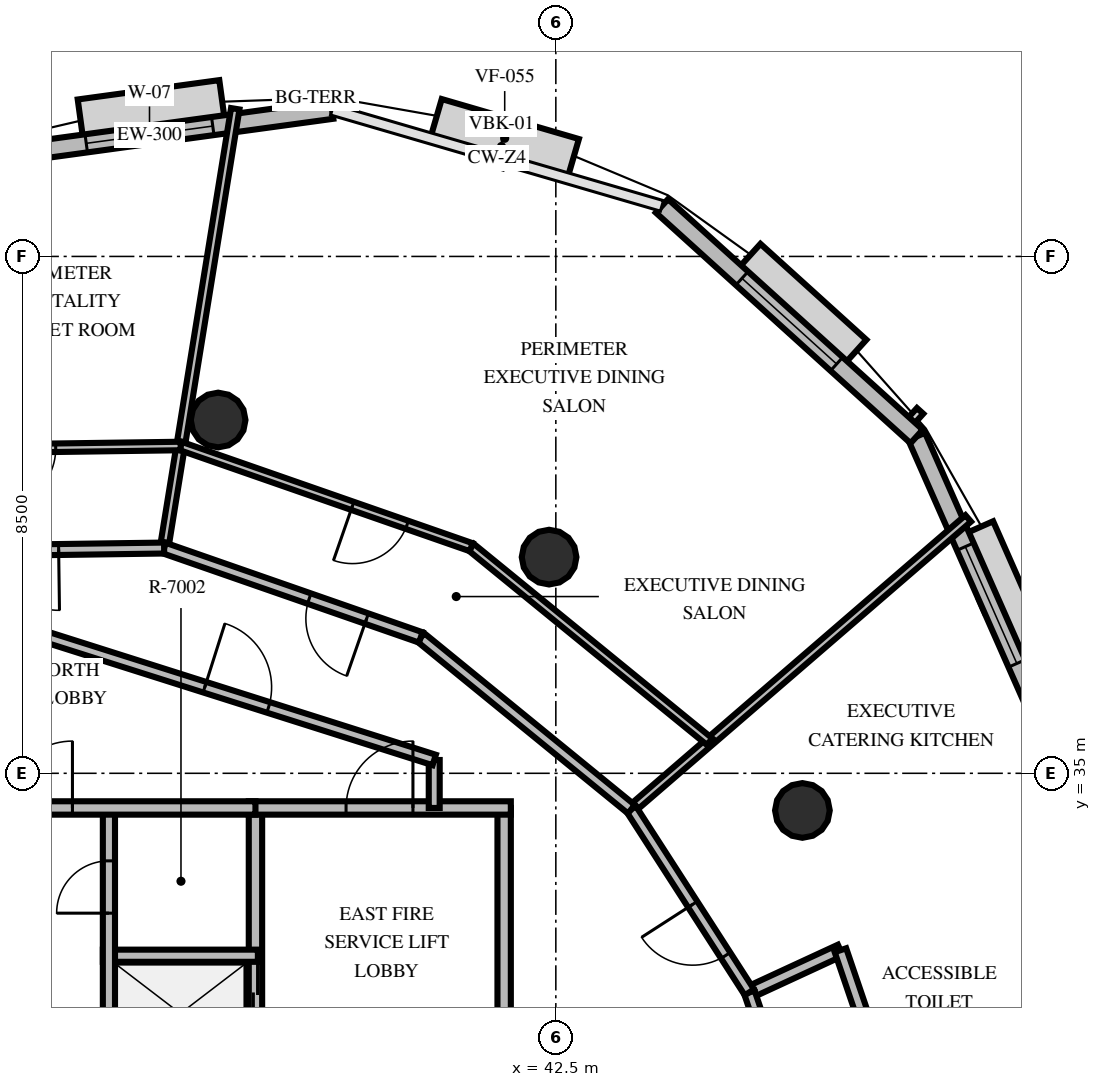
"""IFC4 building model, lengths in metres.
Left out: names, types, materials, properties, quantities, classifications, styles, units other than length and angle.
Written with IfcOpenShell. Run it as: python <this file> out.ifc"""

import sys

from ifc_helpers import new_model, si_unit, direction, frame, frame_2d, origin, origin_2d, place, context, subcontext, project, spatial, rectangle, circle, extrude, element, fill, save


model = new_model("IFC4")
c1 = context("Model", 3, precision=1e-05, world=origin(), true_north=direction((0.0, 1.0)))
c2 = subcontext(c1, "Body", "Model", "MODEL_VIEW")
j1 = project(units=[si_unit("LENGTHUNIT", "METRE"), si_unit("PLANEANGLEUNIT", "RADIAN")], contexts=[c1])
p1 = place(None, origin())
s1 = spatial("IfcSite", under=j1, at=p1, CompositionType="ELEMENT")
p2 = place(p1, origin())
s2 = spatial("IfcBuilding", under=s1, at=p2, CompositionType="ELEMENT")
p3 = place(p2, frame((0.0, 0.0, 280.8)))
s3 = spatial("IfcBuildingStorey", under=s2, at=p3, CompositionType="ELEMENT", Elevation=280.8)
for number, where, z_axis, x_axis in (
    (1, (46.555, 34.389, 0.0), (0.0, 0.0, 1.0), (1.0, 0.0, 0.0)),
    (2, (42.389, 38.555, 0.0), (0.0, 0.0, 1.0), (1.0, 0.0, 0.0)),
    (3, (36.946, 40.81, 0.0), (0.0, 0.0, 1.0), (1.0, 0.0, 0.0)),
):
    element("IfcColumn", number, at=place(p3, frame(where, z_axis=z_axis, x_axis=x_axis)), inside=s3, PredefinedType="COLUMN", context=c2, shape_type="SweptSolid", body=[
        extrude(circle(Radius=0.45, at=origin_2d()), origin(), (0.0, 0.0, 1.0), 3.6),
    ])
p4 = place(p3, frame((38.82, 45.912, 0.0), z_axis=(0.0, 0.0, 1.0), x_axis=(-0.99078452566, -0.135447494301, 0.0)))
e4 = element("IfcWall", 4, at=p4, inside=s3, PredefinedType="SOLIDWALL", context=c2, shape_type="SweptSolid", body=[
    extrude(rectangle(XDim=6.062, YDim=0.3, at=frame_2d((3.031, 0.0))), origin(), (0.0, 0.0, 1.0), 2.76),
])
p5 = place(p4, frame((1.981, 0.0, 0.8)))
e5 = element("IfcOpeningElement", 5, at=p5, cuts=e4, PredefinedType="OPENING", context=c2, shape_type="SweptSolid", body=[
    extrude(rectangle(XDim=2.1, YDim=1.85, at=frame_2d((1.05, 0.925))), frame((0.0, 0.16, 0.0), z_axis=(0.0, -1.0, 0.0), x_axis=(1.0, 0.0, 0.0)), (0.0, 0.0, 1.0), 0.32),
])
p6 = place(p3, frame((50.882, 34.994, 0.0), z_axis=(0.0, 0.0, 1.0), x_axis=(-0.40381273821, 0.91484166524, 0.0)))
e6 = element("IfcWall", 6, at=p6, inside=s3, PredefinedType="SOLIDWALL", context=c2, shape_type="SweptSolid", body=[
    extrude(rectangle(XDim=6.062, YDim=0.3, at=frame_2d((3.031, 0.0))), origin(), (0.0, 0.0, 1.0), 2.76),
])
p7 = place(p6, frame((1.981, 0.0, 0.8)))
e7 = element("IfcOpeningElement", 7, at=p7, cuts=e6, PredefinedType="OPENING", context=c2, shape_type="SweptSolid", body=[
    extrude(rectangle(XDim=2.1, YDim=1.85, at=frame_2d((1.05, 0.925))), frame((0.0, 0.16, 0.0), z_axis=(0.0, -1.0, 0.0), x_axis=(1.0, 0.0, 0.0)), (0.0, 0.0, 1.0), 0.32),
])
p8 = place(p3, frame((48.434, 40.539, 0.0), z_axis=(0.0, 0.0, 1.0), x_axis=(-0.741361737188, 0.671105635972, 0.0)))
e8 = element("IfcWall", 8, at=p8, inside=s3, PredefinedType="SOLIDWALL", context=c2, shape_type="SweptSolid", body=[
    extrude(rectangle(XDim=5.65, YDim=0.3, at=frame_2d((2.825, 0.0))), origin(), (0.0, 0.0, 1.0), 2.76),
])
p9 = place(p8, frame((1.775, 0.0, 0.8)))
e9 = element("IfcOpeningElement", 9, at=p9, cuts=e8, PredefinedType="OPENING", context=c2, shape_type="SweptSolid", body=[
    extrude(rectangle(XDim=2.1, YDim=1.85, at=frame_2d((1.05, 0.925))), frame((0.0, 0.16, 0.0), z_axis=(0.0, -1.0, 0.0), x_axis=(1.0, 0.0, 0.0)), (0.0, 0.0, 1.0), 0.32),
])
p10 = place(p3, frame((37.56, 30.05, 0.0), z_axis=(0.0, 0.0, 1.0), x_axis=(0.0, 1.0, 0.0)))
e10 = element("IfcWall", 10, at=p10, inside=s3, PredefinedType="SOLIDWALL", context=c2, shape_type="SweptSolid", body=[
    extrude(rectangle(XDim=4.38, YDim=0.22, at=frame_2d((2.19, 0.0))), origin(), (0.0, 0.0, 1.0), 2.46),
])
p11 = place(p10, frame((0.8, 0.0, 0.0)))
e11 = element("IfcOpeningElement", 11, at=p11, cuts=e10, PredefinedType="OPENING", context=c2, shape_type="SweptSolid", body=[
    extrude(rectangle(XDim=1.05, YDim=2.1, at=frame_2d((0.525, 1.05))), frame((0.0, 0.12, 0.0), z_axis=(0.0, -1.0, 0.0), x_axis=(1.0, 0.0, 0.0)), (0.0, 0.0, 1.0), 0.24),
])
p12 = place(p3, frame((41.65, 30.05, 0.0), z_axis=(0.0, 0.0, 1.0), x_axis=(0.0, 1.0, 0.0)))
e12 = element("IfcWall", 12, at=p12, inside=s3, PredefinedType="SOLIDWALL", context=c2, shape_type="SweptSolid", body=[
    extrude(rectangle(XDim=4.38, YDim=0.22, at=frame_2d((2.19, 0.0))), origin(), (0.0, 0.0, 1.0), 2.46),
])
p13 = place(p3, frame((37.45, 34.43, 0.0), z_axis=(0.0, 0.0, 1.0), x_axis=(1.0, 0.0, 0.0)))
e13 = element("IfcWall", 13, at=p13, inside=s3, PredefinedType="SOLIDWALL", context=c2, shape_type="SweptSolid", body=[
    extrude(rectangle(XDim=4.31, YDim=0.22, at=frame_2d((2.155, 0.0))), origin(), (0.0, 0.0, 1.0), 2.46),
])
p14 = place(p13, frame((1.6, 0.0, 0.0)))
e14 = element("IfcOpeningElement", 14, at=p14, cuts=e13, PredefinedType="OPENING", context=c2, shape_type="SweptSolid", body=[
    extrude(rectangle(XDim=1.1, YDim=2.15, at=frame_2d((0.55, 1.075))), frame((0.0, 0.12, 0.0), z_axis=(0.0, -1.0, 0.0), x_axis=(1.0, 0.0, 0.0)), (0.0, 0.0, 1.0), 0.24),
])
p15 = place(p3, frame((35.05, 32.0, 0.0), z_axis=(0.0, 0.0, 1.0), x_axis=(1.0, 0.0, 0.0)))
e15 = element("IfcWall", 15, at=p15, inside=s3, PredefinedType="SOLIDWALL", context=c2, shape_type="SweptSolid", body=[
    extrude(rectangle(XDim=2.55, YDim=0.2, at=frame_2d((1.275, 0.0))), origin(), (0.0, 0.0, 1.0), 2.46),
])
p16 = place(p3, frame((35.15, 30.05, 0.0), z_axis=(0.0, 0.0, 1.0), x_axis=(0.0, 1.0, 0.0)))
e16 = element("IfcWall", 16, at=p16, inside=s3, PredefinedType="SOLIDWALL", context=c2, shape_type="SweptSolid", body=[
    extrude(rectangle(XDim=4.38, YDim=0.2, at=frame_2d((2.19, 0.0))), origin(), (0.0, 0.0, 1.0), 2.46),
])
p17 = place(p16, frame((2.65, 0.0, 0.0)))
e17 = element("IfcOpeningElement", 17, at=p17, cuts=e16, PredefinedType="OPENING", context=c2, shape_type="SweptSolid", body=[
    extrude(rectangle(XDim=0.86, YDim=2.05, at=frame_2d((0.43, 1.025))), frame((0.0, 0.11, 0.0), z_axis=(0.0, -1.0, 0.0), x_axis=(1.0, 0.0, 0.0)), (0.0, 0.0, 1.0), 0.22),
])
p18 = place(p3, frame((30.44, 34.43, 0.0), z_axis=(0.0, 0.0, 1.0), x_axis=(1.0, 0.0, 0.0)))
e18 = element("IfcWall", 18, at=p18, inside=s3, PredefinedType="SOLIDWALL", context=c2, shape_type="SweptSolid", body=[
    extrude(rectangle(XDim=7.12, YDim=0.22, at=frame_2d((3.56, 0.0))), origin(), (0.0, 0.0, 1.0), 2.46),
])
p19 = place(p18, frame((3.01, 0.0, 0.0)))
e19 = element("IfcOpeningElement", 19, at=p19, cuts=e18, PredefinedType="OPENING", context=c2, shape_type="SweptSolid", body=[
    extrude(rectangle(XDim=1.1, YDim=2.15, at=frame_2d((0.55, 1.075))), frame((0.0, 0.12, 0.0), z_axis=(0.0, -1.0, 0.0), x_axis=(1.0, 0.0, 0.0)), (0.0, 0.0, 1.0), 0.24),
])
p20 = place(p3, frame((40.5, 35.219, 0.0), z_axis=(0.0, 0.0, 1.0), x_axis=(0.0, -1.0, 0.0)))
e20 = element("IfcWall", 20, at=p20, inside=s3, PredefinedType="PARTITIONING", context=c2, shape_type="SweptSolid", body=[
    extrude(rectangle(XDim=0.789, YDim=0.18, at=frame_2d((0.395, 0.0))), origin(), (0.0, 0.0, 1.0), 2.46),
])
p21 = place(p3, frame((34.0, 37.28, 0.0), z_axis=(0.0, 0.0, 1.0), x_axis=(0.953228121756, -0.302251795518, 0.0)))
e21 = element("IfcWall", 21, at=p21, inside=s3, PredefinedType="PARTITIONING", context=c2, shape_type="SweptSolid", body=[
    extrude(rectangle(XDim=6.819, YDim=0.18, at=frame_2d((3.409, 0.0))), origin(), (0.0, 0.0, 1.0), 2.46),
])
p22 = place(p21, frame((2.86, 0.0, 0.0)))
e22 = element("IfcOpeningElement", 22, at=p22, cuts=e21, PredefinedType="OPENING", context=c2, shape_type="SweptSolid", body=[
    extrude(rectangle(XDim=1.1, YDim=2.15, at=frame_2d((0.55, 1.075))), frame((0.0, 0.1, 0.0), z_axis=(0.0, -1.0, 0.0), x_axis=(1.0, 0.0, 0.0)), (0.0, 0.0, 1.0), 0.2),
])
p23 = place(p3, frame((45.683, 31.398, 0.0), z_axis=(0.0, 0.0, 1.0), x_axis=(0.907764405775, 0.419480373329, 0.0)))
e23 = element("IfcWall", 23, at=p23, inside=s3, PredefinedType="PLUMBINGWALL", context=c2, shape_type="SweptSolid", body=[
    extrude(rectangle(XDim=1.65, YDim=0.2, at=frame_2d((0.825, 0.0))), origin(), (0.0, 0.0, 1.0), 2.46),
])
p24 = place(p3, frame((48.159, 29.217, 0.0), z_axis=(0.0, 0.0, 1.0), x_axis=(-0.322277599522, 0.946645207481, 0.0)))
e24 = element("IfcWall", 24, at=p24, inside=s3, PredefinedType="PLUMBINGWALL", context=c2, shape_type="SweptSolid", body=[
    extrude(rectangle(XDim=3.035, YDim=0.2, at=frame_2d((1.518, 0.0))), origin(), (0.0, 0.0, 1.0), 2.46),
])
p25 = place(p3, frame((46.55, 28.851, 0.0), z_axis=(0.0, 0.0, 1.0), x_axis=(-0.322319163372, 0.946631056391, 0.0)))
e25 = element("IfcWall", 25, at=p25, inside=s3, PredefinedType="PARTITIONING", context=c2, shape_type="SweptSolid", body=[
    extrude(rectangle(XDim=2.69, YDim=0.18, at=frame_2d((1.345, 0.0))), origin(), (0.0, 0.0, 1.0), 2.46),
])
p26 = place(p25, frame((1.167, 0.0, 0.0)))
e26 = element("IfcOpeningElement", 26, at=p26, cuts=e25, PredefinedType="OPENING", context=c2, shape_type="SweptSolid", body=[
    extrude(rectangle(XDim=0.92, YDim=2.1, at=frame_2d((0.46, 1.05))), frame((0.0, 0.1, 0.0), z_axis=(0.0, -1.0, 0.0), x_axis=(1.0, 0.0, 0.0)), (0.0, 0.0, 1.0), 0.2),
])
p27 = place(p3, frame((43.742, 34.409, 0.0), z_axis=(0.0, 0.0, 1.0), x_axis=(0.756998503869, 0.65341660917, 0.0)))
e27 = element("IfcWall", 27, at=p27, inside=s3, PredefinedType="PARTITIONING", context=c2, shape_type="SweptSolid", body=[
    extrude(rectangle(XDim=7.318, YDim=0.14, at=frame_2d((3.659, 0.0))), origin(), (0.0, 0.0, 1.0), 2.46),
])
p28 = place(p3, frame((45.683, 31.398, 0.0), z_axis=(0.0, 0.0, 1.0), x_axis=(-0.54172166433, 0.840557932802, 0.0)))
e28 = element("IfcWall", 28, at=p28, inside=s3, PredefinedType="PARTITIONING", context=c2, shape_type="SweptSolid", body=[
    extrude(rectangle(XDim=3.583, YDim=0.18, at=frame_2d((1.791, 0.0))), origin(), (0.0, 0.0, 1.0), 2.46),
])
p29 = place(p28, frame((0.721, 0.0, 0.0)))
e29 = element("IfcOpeningElement", 29, at=p29, cuts=e28, PredefinedType="OPENING", context=c2, shape_type="SweptSolid", body=[
    extrude(rectangle(XDim=1.0, YDim=2.15, at=frame_2d((0.5, 1.075))), frame((0.0, 0.1, 0.0), z_axis=(0.0, -1.0, 0.0), x_axis=(1.0, 0.0, 0.0)), (0.0, 0.0, 1.0), 0.2),
])
p30 = place(p3, frame((36.058, 38.704, 0.0), z_axis=(0.0, 0.0, 1.0), x_axis=(0.159896328627, 0.987133812657, 0.0)))
e30 = element("IfcWall", 30, at=p30, inside=s3, PredefinedType="PARTITIONING", context=c2, shape_type="SweptSolid", body=[
    extrude(rectangle(XDim=7.318, YDim=0.14, at=frame_2d((3.659, 0.0))), origin(), (0.0, 0.0, 1.0), 2.46),
])
p31 = place(p3, frame((43.742, 34.409, 0.0), z_axis=(0.0, 0.0, 1.0), x_axis=(-0.774907966297, 0.632074080919, 0.0)))
e31 = element("IfcWall", 31, at=p31, inside=s3, PredefinedType="PARTITIONING", context=c2, shape_type="SweptSolid", body=[
    extrude(rectangle(XDim=4.47, YDim=0.18, at=frame_2d((2.235, 0.0))), origin(), (0.0, 0.0, 1.0), 2.46),
])
p32 = place(p3, frame((40.279, 37.235, 0.0), z_axis=(0.0, 0.0, 1.0), x_axis=(-0.944393587755, 0.328817200595, 0.0)))
e32 = element("IfcWall", 32, at=p32, inside=s3, PredefinedType="PARTITIONING", context=c2, shape_type="SweptSolid", body=[
    extrude(rectangle(XDim=4.47, YDim=0.18, at=frame_2d((2.235, 0.0))), origin(), (0.0, 0.0, 1.0), 2.46),
])
p33 = place(p32, frame((0.942, 0.0, 0.0)))
e33 = element("IfcOpeningElement", 33, at=p33, cuts=e32, PredefinedType="OPENING", context=c2, shape_type="SweptSolid", body=[
    extrude(rectangle(XDim=1.0, YDim=2.15, at=frame_2d((0.5, 1.075))), frame((0.0, 0.1, 0.0), z_axis=(0.0, -1.0, 0.0), x_axis=(1.0, 0.0, 0.0)), (0.0, 0.0, 1.0), 0.2),
])
p34 = place(p3, frame((45.029, 35.52, 0.0), z_axis=(0.0, 0.0, 1.0), x_axis=(-0.774921612032, 0.6320573512, 0.0)))
e34 = element("IfcWall", 34, at=p34, inside=s3, PredefinedType="PARTITIONING", context=c2, shape_type="SweptSolid", body=[
    extrude(rectangle(XDim=5.06, YDim=0.14, at=frame_2d((2.53, 0.0))), origin(), (0.0, 0.0, 1.0), 2.46),
])
p35 = place(p3, frame((41.108, 38.719, 0.0), z_axis=(0.0, 0.0, 1.0), x_axis=(-0.944376965855, 0.328864936354, 0.0)))
e35 = element("IfcWall", 35, at=p35, inside=s3, PredefinedType="PARTITIONING", context=c2, shape_type="SweptSolid", body=[
    extrude(rectangle(XDim=5.06, YDim=0.14, at=frame_2d((2.53, 0.0))), origin(), (0.0, 0.0, 1.0), 2.46),
])
p36 = place(p35, frame((1.117, 0.0, 0.0)))
e36 = element("IfcOpeningElement", 36, at=p36, cuts=e35, PredefinedType="OPENING", context=c2, shape_type="SweptSolid", body=[
    extrude(rectangle(XDim=0.95, YDim=2.15, at=frame_2d((0.475, 1.075))), frame((0.0, 0.08, 0.0), z_axis=(0.0, -1.0, 0.0), x_axis=(1.0, 0.0, 0.0)), (0.0, 0.0, 1.0), 0.16),
])
p37 = place(p3, frame((36.058, 38.704, 0.0), z_axis=(0.0, 0.0, 1.0), x_axis=(-0.99990299363, -0.013928507778, 0.0)))
e37 = element("IfcWall", 37, at=p37, inside=s3, PredefinedType="PARTITIONING", context=c2, shape_type="SweptSolid", body=[
    extrude(rectangle(XDim=4.47, YDim=0.18, at=frame_2d((2.235, 0.0))), origin(), (0.0, 0.0, 1.0), 2.46),
])
p38 = place(p37, frame((1.735, 0.0, 0.0)))
e38 = element("IfcOpeningElement", 38, at=p38, cuts=e37, PredefinedType="OPENING", context=c2, shape_type="SweptSolid", body=[
    extrude(rectangle(XDim=1.0, YDim=2.15, at=frame_2d((0.5, 1.075))), frame((0.0, 0.1, 0.0), z_axis=(0.0, -1.0, 0.0), x_axis=(1.0, 0.0, 0.0)), (0.0, 0.0, 1.0), 0.2),
])
p39 = place(p3, frame((36.33, 40.383, 0.0), z_axis=(0.0, 0.0, 1.0), x_axis=(-0.999902780096, -0.013943828578, 0.0)))
e39 = element("IfcWall", 39, at=p39, inside=s3, PredefinedType="PARTITIONING", context=c2, shape_type="SweptSolid", body=[
    extrude(rectangle(XDim=5.06, YDim=0.14, at=frame_2d((2.53, 0.0))), origin(), (0.0, 0.0, 1.0), 2.46),
])
p40 = place(p39, frame((2.055, 0.0, 0.0)))
e40 = element("IfcOpeningElement", 40, at=p40, cuts=e39, PredefinedType="OPENING", context=c2, shape_type="SweptSolid", body=[
    extrude(rectangle(XDim=0.95, YDim=2.15, at=frame_2d((0.475, 1.075))), frame((0.0, 0.08, 0.0), z_axis=(0.0, -1.0, 0.0), x_axis=(1.0, 0.0, 0.0)), (0.0, 0.0, 1.0), 0.16),
])
p41 = place(p5, origin())
e41 = element("IfcWindow", 41, at=p41, inside=s3, PartitioningType="SINGLE_PANEL", PredefinedType="WINDOW", context=c2, shape_type="SweptSolid", body=[
    extrude(rectangle(XDim=2.1, YDim=1.85, at=frame_2d((1.05, 0.925))), frame((0.0, 0.03, 0.0), z_axis=(0.0, -1.0, 0.0), x_axis=(1.0, 0.0, 0.0)), (0.0, 0.0, 1.0), 0.06),
])
fill(e5, e41)
p42 = place(p7, origin())
e42 = element("IfcWindow", 42, at=p42, inside=s3, PartitioningType="SINGLE_PANEL", PredefinedType="WINDOW", context=c2, shape_type="SweptSolid", body=[
    extrude(rectangle(XDim=2.1, YDim=1.85, at=frame_2d((1.05, 0.925))), frame((0.0, 0.03, 0.0), z_axis=(0.0, -1.0, 0.0), x_axis=(1.0, 0.0, 0.0)), (0.0, 0.0, 1.0), 0.06),
])
fill(e7, e42)
p43 = place(p9, origin())
e43 = element("IfcWindow", 43, at=p43, inside=s3, PartitioningType="SINGLE_PANEL", PredefinedType="WINDOW", context=c2, shape_type="SweptSolid", body=[
    extrude(rectangle(XDim=2.1, YDim=1.85, at=frame_2d((1.05, 0.925))), frame((0.0, 0.03, 0.0), z_axis=(0.0, -1.0, 0.0), x_axis=(1.0, 0.0, 0.0)), (0.0, 0.0, 1.0), 0.06),
])
fill(e9, e43)
p44 = place(p14, origin())
e44 = element("IfcDoor", 44, at=p44, inside=s3, OperationType="SINGLE_SWING_RIGHT", PredefinedType="DOOR", context=c2, shape_type="SweptSolid", body=[
    extrude(rectangle(XDim=1.1, YDim=2.15, at=frame_2d((0.55, 1.075))), frame((0.0, 0.025, 0.0), z_axis=(0.0, -1.0, 0.0), x_axis=(1.0, 0.0, 0.0)), (0.0, 0.0, 1.0), 0.05),
])
fill(e14, e44)
p45 = place(p11, origin())
e45 = element("IfcDoor", 45, at=p45, inside=s3, OperationType="DOUBLE_DOOR_SLIDING", PredefinedType="USERDEFINED", context=c2, shape_type="SweptSolid", body=[
    extrude(rectangle(XDim=1.05, YDim=2.1, at=frame_2d((0.525, 1.05))), frame((0.0, 0.025, 0.0), z_axis=(0.0, -1.0, 0.0), x_axis=(1.0, 0.0, 0.0)), (0.0, 0.0, 1.0), 0.05),
])
fill(e11, e45)
p46 = place(p17, origin())
e46 = element("IfcDoor", 46, at=p46, inside=s3, OperationType="SINGLE_SWING_LEFT", PredefinedType="TRAPDOOR", context=c2, shape_type="SweptSolid", body=[
    extrude(rectangle(XDim=0.86, YDim=2.05, at=frame_2d((0.43, 1.025))), frame((0.0, 0.025, 0.0), z_axis=(0.0, -1.0, 0.0), x_axis=(1.0, 0.0, 0.0)), (0.0, 0.0, 1.0), 0.05),
])
fill(e17, e46)
p47 = place(p19, origin())
e47 = element("IfcDoor", 47, at=p47, inside=s3, OperationType="SINGLE_SWING_RIGHT", PredefinedType="DOOR", context=c2, shape_type="SweptSolid", body=[
    extrude(rectangle(XDim=1.1, YDim=2.15, at=frame_2d((0.55, 1.075))), frame((0.0, 0.025, 0.0), z_axis=(0.0, -1.0, 0.0), x_axis=(1.0, 0.0, 0.0)), (0.0, 0.0, 1.0), 0.05),
])
fill(e19, e47)
p48 = place(p22, origin())
e48 = element("IfcDoor", 48, at=p48, inside=s3, OperationType="SINGLE_SWING_LEFT", PredefinedType="DOOR", context=c2, shape_type="SweptSolid", body=[
    extrude(rectangle(XDim=1.1, YDim=2.15, at=frame_2d((0.55, 1.075))), frame((0.0, 0.025, 0.0), z_axis=(0.0, -1.0, 0.0), x_axis=(1.0, 0.0, 0.0)), (0.0, 0.0, 1.0), 0.05),
])
fill(e22, e48)
p49 = place(p29, origin())
e49 = element("IfcDoor", 49, at=p49, inside=s3, OperationType="SINGLE_SWING_RIGHT", PredefinedType="DOOR", context=c2, shape_type="SweptSolid", body=[
    extrude(rectangle(XDim=1.0, YDim=2.15, at=frame_2d((0.5, 1.075))), frame((0.0, 0.025, 0.0), z_axis=(0.0, -1.0, 0.0), x_axis=(1.0, 0.0, 0.0)), (0.0, 0.0, 1.0), 0.05),
])
fill(e29, e49)
p50 = place(p33, origin())
e50 = element("IfcDoor", 50, at=p50, inside=s3, OperationType="SINGLE_SWING_LEFT", PredefinedType="DOOR", context=c2, shape_type="SweptSolid", body=[
    extrude(rectangle(XDim=1.0, YDim=2.15, at=frame_2d((0.5, 1.075))), frame((0.0, 0.025, 0.0), z_axis=(0.0, -1.0, 0.0), x_axis=(1.0, 0.0, 0.0)), (0.0, 0.0, 1.0), 0.05),
])
fill(e33, e50)
p51 = place(p36, origin())
e51 = element("IfcDoor", 51, at=p51, inside=s3, OperationType="SINGLE_SWING_RIGHT", PredefinedType="DOOR", context=c2, shape_type="SweptSolid", body=[
    extrude(rectangle(XDim=0.95, YDim=2.15, at=frame_2d((0.475, 1.075))), frame((0.0, 0.025, 0.0), z_axis=(0.0, -1.0, 0.0), x_axis=(1.0, 0.0, 0.0)), (0.0, 0.0, 1.0), 0.05),
])
fill(e36, e51)
p52 = place(p38, origin())
e52 = element("IfcDoor", 52, at=p52, inside=s3, OperationType="SINGLE_SWING_LEFT", PredefinedType="DOOR", context=c2, shape_type="SweptSolid", body=[
    extrude(rectangle(XDim=1.0, YDim=2.15, at=frame_2d((0.5, 1.075))), frame((0.0, 0.025, 0.0), z_axis=(0.0, -1.0, 0.0), x_axis=(1.0, 0.0, 0.0)), (0.0, 0.0, 1.0), 0.05),
])
fill(e38, e52)
p53 = place(p40, origin())
e53 = element("IfcDoor", 53, at=p53, inside=s3, OperationType="SINGLE_SWING_RIGHT", PredefinedType="DOOR", context=c2, shape_type="SweptSolid", body=[
    extrude(rectangle(XDim=0.95, YDim=2.15, at=frame_2d((0.475, 1.075))), frame((0.0, 0.025, 0.0), z_axis=(0.0, -1.0, 0.0), x_axis=(1.0, 0.0, 0.0)), (0.0, 0.0, 1.0), 0.05),
])
fill(e40, e53)
save(model, sys.argv[1])
